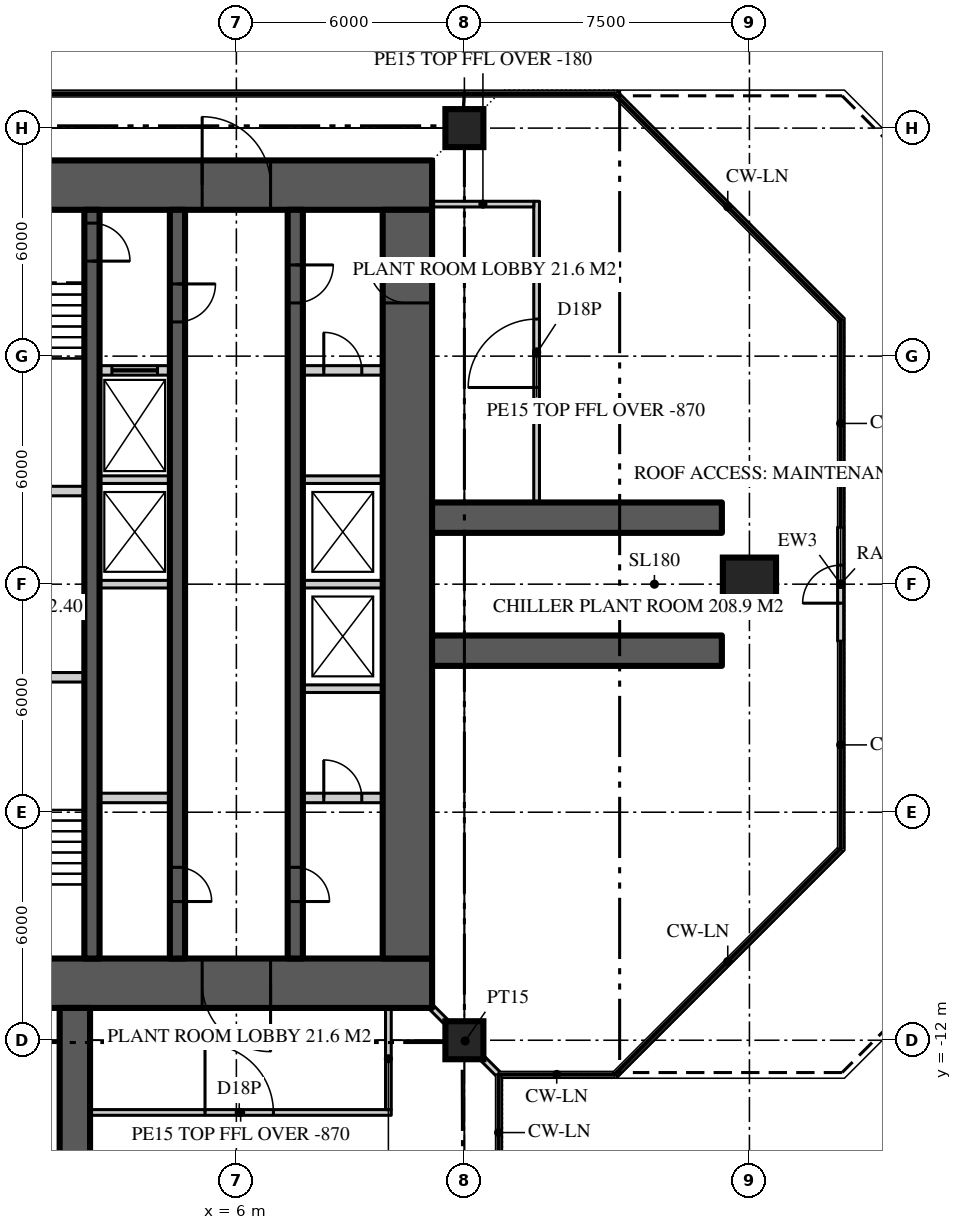
"""IFC4 building model, lengths in metres.
Left out: names, types, materials, properties, quantities, classifications, styles, units other than length and angle.
Written with IfcOpenShell. Run it as: python <this file> out.ifc"""

import sys

from ifc_helpers import new_model, si_unit, direction, frame, frame_2d, origin, origin_2d, place, context, subcontext, project, spatial, rectangle, extrude, element, fill, save


model = new_model("IFC4")
c1 = context("Model", 3, precision=1e-05, world=origin(), true_north=direction((0.0, 1.0)))
c2 = subcontext(c1, "Body", "Model", "MODEL_VIEW")
j1 = project(units=[si_unit("LENGTHUNIT", "METRE"), si_unit("PLANEANGLEUNIT", "RADIAN")], contexts=[c1])
p1 = place(None, origin())
s1 = spatial("IfcSite", under=j1, at=p1, CompositionType="ELEMENT")
p2 = place(p1, origin())
s2 = spatial("IfcBuilding", under=s1, at=p2, CompositionType="ELEMENT")
p3 = place(p2, frame((0.0, 0.0, 306.3)))
s3 = spatial("IfcBuildingStorey", under=s2, at=p3, CompositionType="ELEMENT", Elevation=306.3)
p4 = place(p3, frame((-11.15, 10.5, 0.0), z_axis=(0.0, 0.0, 1.0), x_axis=(1.0, 0.0, 0.0)))
e1 = element("IfcWall", 1, at=p4, inside=s3, PredefinedType="SHEAR", context=c2, shape_type="SweptSolid", body=[
    extrude(rectangle(XDim=22.3, YDim=1.3, at=frame_2d((11.15, 0.0))), origin(), (0.0, 0.0, 1.0), 5.0),
])
p5 = place(p4, frame((4.25, 0.0, 0.0)))
e2 = element("IfcOpeningElement", 2, at=p5, cuts=e1, PredefinedType="OPENING", context=c2, shape_type="SweptSolid", body=[
    extrude(rectangle(XDim=1.8, YDim=2.2, at=frame_2d((0.9, 1.1))), frame((0.0, 0.66, 0.0), z_axis=(0.0, -1.0, 0.0), x_axis=(1.0, 0.0, 0.0)), (0.0, 0.0, 1.0), 1.32),
])
p6 = place(p4, frame((16.25, 0.0, 0.0)))
e3 = element("IfcOpeningElement", 3, at=p6, cuts=e1, PredefinedType="OPENING", context=c2, shape_type="SweptSolid", body=[
    extrude(rectangle(XDim=1.8, YDim=2.2, at=frame_2d((0.9, 1.1))), frame((0.0, 0.66, 0.0), z_axis=(0.0, -1.0, 0.0), x_axis=(1.0, 0.0, 0.0)), (0.0, 0.0, 1.0), 1.32),
])
p7 = place(p3, frame((11.15, -10.5, 0.0), z_axis=(0.0, 0.0, 1.0), x_axis=(-1.0, 0.0, 0.0)))
e4 = element("IfcWall", 4, at=p7, inside=s3, PredefinedType="SHEAR", context=c2, shape_type="SweptSolid", body=[
    extrude(rectangle(XDim=22.3, YDim=1.3, at=frame_2d((11.15, 0.0))), origin(), (0.0, 0.0, 1.0), 5.0),
])
p8 = place(p7, frame((16.25, 0.0, 0.0)))
e5 = element("IfcOpeningElement", 5, at=p8, cuts=e4, PredefinedType="OPENING", context=c2, shape_type="SweptSolid", body=[
    extrude(rectangle(XDim=1.8, YDim=2.2, at=frame_2d((0.9, 1.1))), frame((0.0, 0.66, 0.0), z_axis=(0.0, -1.0, 0.0), x_axis=(1.0, 0.0, 0.0)), (0.0, 0.0, 1.0), 1.32),
])
p9 = place(p7, frame((4.25, 0.0, 0.0)))
e6 = element("IfcOpeningElement", 6, at=p9, cuts=e4, PredefinedType="OPENING", context=c2, shape_type="SweptSolid", body=[
    extrude(rectangle(XDim=1.8, YDim=2.2, at=frame_2d((0.9, 1.1))), frame((0.0, 0.66, 0.0), z_axis=(0.0, -1.0, 0.0), x_axis=(1.0, 0.0, 0.0)), (0.0, 0.0, 1.0), 1.32),
])
p10 = place(p3, frame((10.5, -9.85, 0.0), z_axis=(0.0, 0.0, 1.0), x_axis=(0.0, 1.0, 0.0)))
e7 = element("IfcWall", 7, at=p10, inside=s3, PredefinedType="SHEAR", context=c2, shape_type="SweptSolid", body=[
    extrude(rectangle(XDim=19.7, YDim=1.3, at=frame_2d((9.85, 0.0))), origin(), (0.0, 0.0, 1.0), 5.0),
])
p11 = place(p10, frame((17.25, 0.0, 0.0)))
e8 = element("IfcOpeningElement", 8, at=p11, cuts=e7, PredefinedType="OPENING", context=c2, shape_type="SweptSolid", body=[
    extrude(rectangle(XDim=1.0, YDim=2.2, at=frame_2d((0.5, 1.1))), frame((0.0, 0.66, 0.0), z_axis=(0.0, -1.0, 0.0), x_axis=(1.0, 0.0, 0.0)), (0.0, 0.0, 1.0), 1.32),
])
for number, where, z_axis, x_axis in (
    (9, (11.15, -1.75, 0.0), (0.0, 0.0, 1.0), (1.0, 0.0, 0.0)),
    (10, (11.15, 1.75, 0.0), (0.0, 0.0, 1.0), (1.0, 0.0, 0.0)),
    (11, (1.75, -11.15, 0.0), (0.0, 0.0, 1.0), (0.0, -1.0, 0.0)),
):
    element("IfcWall", number, at=place(p3, frame(where, z_axis=z_axis, x_axis=x_axis)), inside=s3, PredefinedType="SHEAR", context=c2, shape_type="SweptSolid", body=[
        extrude(rectangle(XDim=7.625, YDim=0.8, at=frame_2d((3.812, 0.0))), origin(), (0.0, 0.0, 1.0), 5.0),
    ])
p12 = place(p3, frame((12.0, -12.0, 0.0), z_axis=(0.0, 0.0, 1.0), x_axis=(1.0, 0.0, 0.0)))
e12 = element("IfcColumn", 12, at=p12, inside=s3, PredefinedType="COLUMN", context=c2, shape_type="SweptSolid", body=[
    extrude(rectangle(XDim=1.0, YDim=1.0, at=origin_2d()), origin(), (0.0, 0.0, 1.0), 5.0),
])
p13 = place(p3, frame((19.5, 0.0, 0.0), z_axis=(0.0, 0.0, 1.0), x_axis=(1.0, 0.0, 0.0)))
e13 = element("IfcColumn", 13, at=p13, inside=s3, PredefinedType="COLUMN", context=c2, shape_type="SweptSolid", body=[
    extrude(rectangle(XDim=1.4, YDim=1.4, at=origin_2d()), origin(), (0.0, 0.0, 1.0), 5.0),
])
p14 = place(p3, frame((12.0, 12.0, 0.0), z_axis=(0.0, 0.0, 1.0), x_axis=(1.0, 0.0, 0.0)))
e14 = element("IfcColumn", 14, at=p14, inside=s3, PredefinedType="COLUMN", context=c2, shape_type="SweptSolid", body=[
    extrude(rectangle(XDim=1.0, YDim=1.0, at=origin_2d()), origin(), (0.0, 0.0, 1.0), 5.0),
])
p15 = place(p3, frame((21.9, -1.5, 0.0), z_axis=(0.0, 0.0, 1.0), x_axis=(0.0, 1.0, 0.0)))
e15 = element("IfcWall", 15, at=p15, inside=s3, PredefinedType="SOLIDWALL", context=c2, shape_type="SweptSolid", body=[
    extrude(rectangle(XDim=3.0, YDim=0.16, at=frame_2d((1.5, 0.0))), origin(), (0.0, 0.0, 1.0), 4.82),
])
p16 = place(p15, frame((1.0, 0.0, 0.0)))
e16 = element("IfcOpeningElement", 16, at=p16, cuts=e15, PredefinedType="OPENING", context=c2, shape_type="SweptSolid", body=[
    extrude(rectangle(XDim=1.0, YDim=2.2, at=frame_2d((0.5, 1.1))), frame((0.0, 0.09, 0.0), z_axis=(0.0, -1.0, 0.0), x_axis=(1.0, 0.0, 0.0)), (0.0, 0.0, 1.0), 0.18),
])
p17 = place(p3, frame((7.55, 9.85, 0.0), z_axis=(0.0, 0.0, 1.0), x_axis=(0.0, -1.0, 0.0)))
e17 = element("IfcWall", 17, at=p17, inside=s3, PredefinedType="SHEAR", context=c2, shape_type="SweptSolid", body=[
    extrude(rectangle(XDim=19.7, YDim=0.4, at=frame_2d((9.85, 0.0))), origin(), (0.0, 0.0, 1.0), 5.0),
])
p18 = place(p17, frame((1.45, 0.0, 0.0)))
e18 = element("IfcOpeningElement", 18, at=p18, cuts=e17, PredefinedType="OPENING", context=c2, shape_type="SweptSolid", body=[
    extrude(rectangle(XDim=1.0, YDim=2.2, at=frame_2d((0.5, 1.1))), frame((0.0, 0.21, 0.0), z_axis=(0.0, -1.0, 0.0), x_axis=(1.0, 0.0, 0.0)), (0.0, 0.0, 1.0), 0.42),
])
p19 = place(p17, frame((17.3, 0.0, 0.0)))
e19 = element("IfcOpeningElement", 19, at=p19, cuts=e17, PredefinedType="OPENING", context=c2, shape_type="SweptSolid", body=[
    extrude(rectangle(XDim=0.9, YDim=2.1, at=frame_2d((0.45, 1.05))), frame((0.0, 0.21, 0.0), z_axis=(0.0, -1.0, 0.0), x_axis=(1.0, 0.0, 0.0)), (0.0, 0.0, 1.0), 0.42),
])
p20 = place(p3, frame((4.45, 9.85, 0.0), z_axis=(0.0, 0.0, 1.0), x_axis=(0.0, -1.0, 0.0)))
e20 = element("IfcWall", 20, at=p20, inside=s3, PredefinedType="SHEAR", context=c2, shape_type="SweptSolid", body=[
    extrude(rectangle(XDim=19.7, YDim=0.4, at=frame_2d((9.85, 0.0))), origin(), (0.0, 0.0, 1.0), 5.0),
])
p21 = place(p20, frame((1.95, 0.0, 0.0)))
e21 = element("IfcOpeningElement", 21, at=p21, cuts=e20, PredefinedType="OPENING", context=c2, shape_type="SweptSolid", body=[
    extrude(rectangle(XDim=1.0, YDim=2.2, at=frame_2d((0.5, 1.1))), frame((0.0, 0.21, 0.0), z_axis=(0.0, -1.0, 0.0), x_axis=(1.0, 0.0, 0.0)), (0.0, 0.0, 1.0), 0.42),
])
p22 = place(p20, frame((17.3, 0.0, 0.0)))
e22 = element("IfcOpeningElement", 22, at=p22, cuts=e20, PredefinedType="OPENING", context=c2, shape_type="SweptSolid", body=[
    extrude(rectangle(XDim=0.9, YDim=2.1, at=frame_2d((0.45, 1.05))), frame((0.0, 0.21, 0.0), z_axis=(0.0, -1.0, 0.0), x_axis=(1.0, 0.0, 0.0)), (0.0, 0.0, 1.0), 0.42),
])
p23 = place(p3, frame((2.2, 9.85, 0.0), z_axis=(0.0, 0.0, 1.0), x_axis=(0.0, -1.0, 0.0)))
e23 = element("IfcWall", 23, at=p23, inside=s3, PredefinedType="SHEAR", context=c2, shape_type="SweptSolid", body=[
    extrude(rectangle(XDim=19.7, YDim=0.4, at=frame_2d((9.85, 0.0))), origin(), (0.0, 0.0, 1.0), 5.0),
])
p24 = place(p23, frame((0.35, 0.0, 0.0)))
e24 = element("IfcOpeningElement", 24, at=p24, cuts=e23, PredefinedType="OPENING", context=c2, shape_type="SweptSolid", body=[
    extrude(rectangle(XDim=1.0, YDim=2.2, at=frame_2d((0.5, 1.1))), frame((0.0, 0.21, 0.0), z_axis=(0.0, -1.0, 0.0), x_axis=(1.0, 0.0, 0.0)), (0.0, 0.0, 1.0), 0.42),
])
p25 = place(p3, frame((2.4, 5.625, 0.0), z_axis=(0.0, 0.0, 1.0), x_axis=(1.0, 0.0, 0.0)))
e25 = element("IfcWall", 25, at=p25, inside=s3, PredefinedType="SOLIDWALL", context=c2, shape_type="SweptSolid", body=[
    extrude(rectangle(XDim=1.85, YDim=0.25, at=frame_2d((0.925, 0.0))), origin(), (0.0, 0.0, 1.0), 4.8),
])
p26 = place(p25, frame((0.325, 0.0, 0.0)))
e26 = element("IfcOpeningElement", 26, at=p26, cuts=e25, PredefinedType="OPENING", context=c2, shape_type="SweptSolid", body=[
    extrude(rectangle(XDim=1.2, YDim=2.2, at=frame_2d((0.6, 1.1))), frame((0.0, 0.135, 0.0), z_axis=(0.0, -1.0, 0.0), x_axis=(1.0, 0.0, 0.0)), (0.0, 0.0, 1.0), 0.27),
])
p27 = place(p3, frame((7.75, 5.625, 0.0), z_axis=(0.0, 0.0, 1.0), x_axis=(1.0, 0.0, 0.0)))
e27 = element("IfcWall", 27, at=p27, inside=s3, PredefinedType="SOLIDWALL", context=c2, shape_type="SweptSolid", body=[
    extrude(rectangle(XDim=2.1, YDim=0.25, at=frame_2d((1.05, 0.0))), origin(), (0.0, 0.0, 1.0), 4.8),
])
p28 = place(p27, frame((0.55, 0.0, 0.0)))
e28 = element("IfcOpeningElement", 28, at=p28, cuts=e27, PredefinedType="OPENING", context=c2, shape_type="SweptSolid", body=[
    extrude(rectangle(XDim=1.0, YDim=2.2, at=frame_2d((0.5, 1.1))), frame((0.0, 0.135, 0.0), z_axis=(0.0, -1.0, 0.0), x_axis=(1.0, 0.0, 0.0)), (0.0, 0.0, 1.0), 0.27),
])
p29 = place(p3, frame((2.4, -5.625, 0.0), z_axis=(0.0, 0.0, 1.0), x_axis=(1.0, 0.0, 0.0)))
e29 = element("IfcWall", 29, at=p29, inside=s3, PredefinedType="SOLIDWALL", context=c2, shape_type="SweptSolid", body=[
    extrude(rectangle(XDim=1.85, YDim=0.25, at=frame_2d((0.925, 0.0))), origin(), (0.0, 0.0, 1.0), 4.8),
])
p30 = place(p3, frame((7.75, -5.625, 0.0), z_axis=(0.0, 0.0, 1.0), x_axis=(1.0, 0.0, 0.0)))
e30 = element("IfcWall", 30, at=p30, inside=s3, PredefinedType="SOLIDWALL", context=c2, shape_type="SweptSolid", body=[
    extrude(rectangle(XDim=2.1, YDim=0.25, at=frame_2d((1.05, 0.0))), origin(), (0.0, 0.0, 1.0), 4.8),
])
p31 = place(p30, frame((0.55, 0.0, 0.0)))
e31 = element("IfcOpeningElement", 31, at=p31, cuts=e30, PredefinedType="OPENING", context=c2, shape_type="SweptSolid", body=[
    extrude(rectangle(XDim=1.0, YDim=2.2, at=frame_2d((0.5, 1.1))), frame((0.0, 0.135, 0.0), z_axis=(0.0, -1.0, 0.0), x_axis=(1.0, 0.0, 0.0)), (0.0, 0.0, 1.0), 0.27),
])
for number, where, z_axis, x_axis in (
    (32, (-2.0, -2.45, 0.0), (0.0, 0.0, 1.0), (1.0, 0.0, 0.0)),
    (33, (-2.0, 2.45, 0.0), (0.0, 0.0, 1.0), (1.0, 0.0, 0.0)),
):
    element("IfcWall", number, at=place(p3, frame(where, z_axis=z_axis, x_axis=x_axis)), inside=s3, PredefinedType="SOLIDWALL", context=c2, shape_type="SweptSolid", body=[
        extrude(rectangle(XDim=4.0, YDim=0.25, at=frame_2d((2.0, 0.0))), origin(), (0.0, 0.0, 1.0), 4.8),
    ])
p32 = place(p3, frame((7.75, -2.75, 0.0), z_axis=(0.0, 0.0, 1.0), x_axis=(1.0, 0.0, 0.0)))
e34 = element("IfcWall", 34, at=p32, inside=s3, PredefinedType="SOLIDWALL", context=c2, shape_type="SweptSolid", body=[
    extrude(rectangle(XDim=2.1, YDim=0.2, at=frame_2d((1.05, 0.0))), origin(), (0.0, 0.0, 1.0), 4.8),
])
p33 = place(p3, frame((2.4, 0.0, 0.0), z_axis=(0.0, 0.0, 1.0), x_axis=(1.0, 0.0, 0.0)))
e35 = element("IfcWall", 35, at=p33, inside=s3, PredefinedType="SOLIDWALL", context=c2, shape_type="SweptSolid", body=[
    extrude(rectangle(XDim=1.85, YDim=0.2, at=frame_2d((0.925, 0.0))), origin(), (0.0, 0.0, 1.0), 4.8),
])
p34 = place(p3, frame((7.75, 0.0, 0.0), z_axis=(0.0, 0.0, 1.0), x_axis=(1.0, 0.0, 0.0)))
e36 = element("IfcWall", 36, at=p34, inside=s3, PredefinedType="SOLIDWALL", context=c2, shape_type="SweptSolid", body=[
    extrude(rectangle(XDim=2.1, YDim=0.2, at=frame_2d((1.05, 0.0))), origin(), (0.0, 0.0, 1.0), 4.8),
])
p35 = place(p3, frame((2.4, 2.75, 0.0), z_axis=(0.0, 0.0, 1.0), x_axis=(1.0, 0.0, 0.0)))
e37 = element("IfcWall", 37, at=p35, inside=s3, PredefinedType="SOLIDWALL", context=c2, shape_type="SweptSolid", body=[
    extrude(rectangle(XDim=1.85, YDim=0.2, at=frame_2d((0.925, 0.0))), origin(), (0.0, 0.0, 1.0), 4.8),
])
p36 = place(p3, frame((7.75, 2.75, 0.0), z_axis=(0.0, 0.0, 1.0), x_axis=(1.0, 0.0, 0.0)))
e38 = element("IfcWall", 38, at=p36, inside=s3, PredefinedType="SOLIDWALL", context=c2, shape_type="SweptSolid", body=[
    extrude(rectangle(XDim=2.1, YDim=0.2, at=frame_2d((1.05, 0.0))), origin(), (0.0, 0.0, 1.0), 4.8),
])
p37 = place(p3, frame((13.9, 2.15, 0.0), z_axis=(0.0, 0.0, 1.0), x_axis=(0.0, 1.0, 0.0)))
e39 = element("IfcWall", 39, at=p37, inside=s3, PredefinedType="SOLIDWALL", context=c2, shape_type="SweptSolid", body=[
    extrude(rectangle(XDim=7.925, YDim=0.15, at=frame_2d((3.962, 0.0))), origin(), (0.0, 0.0, 1.0), 4.13),
])
p38 = place(p37, frame((3.025, 0.0, 0.0)))
e40 = element("IfcOpeningElement", 40, at=p38, cuts=e39, PredefinedType="OPENING", context=c2, shape_type="SweptSolid", body=[
    extrude(rectangle(XDim=1.8, YDim=2.4, at=frame_2d((0.9, 1.2))), frame((0.0, 0.085, 0.0), z_axis=(0.0, -1.0, 0.0), x_axis=(1.0, 0.0, 0.0)), (0.0, 0.0, 1.0), 0.17),
])
p39 = place(p3, frame((11.15, 10.0, 0.0), z_axis=(0.0, 0.0, 1.0), x_axis=(1.0, 0.0, 0.0)))
e41 = element("IfcWall", 41, at=p39, inside=s3, PredefinedType="SOLIDWALL", context=c2, shape_type="SweptSolid", body=[
    extrude(rectangle(XDim=2.675, YDim=0.15, at=frame_2d((1.337, 0.0))), origin(), (0.0, 0.0, 1.0), 4.82),
])
p40 = place(p3, frame((2.15, -13.9, 0.0), z_axis=(0.0, 0.0, 1.0), x_axis=(1.0, 0.0, 0.0)))
e42 = element("IfcWall", 42, at=p40, inside=s3, PredefinedType="SOLIDWALL", context=c2, shape_type="SweptSolid", body=[
    extrude(rectangle(XDim=7.925, YDim=0.15, at=frame_2d((3.962, 0.0))), origin(), (0.0, 0.0, 1.0), 4.13),
])
p41 = place(p40, frame((3.025, 0.0, 0.0)))
e43 = element("IfcOpeningElement", 43, at=p41, cuts=e42, PredefinedType="OPENING", context=c2, shape_type="SweptSolid", body=[
    extrude(rectangle(XDim=1.8, YDim=2.4, at=frame_2d((0.9, 1.2))), frame((0.0, 0.085, 0.0), z_axis=(0.0, -1.0, 0.0), x_axis=(1.0, 0.0, 0.0)), (0.0, 0.0, 1.0), 0.17),
])
p42 = place(p3, frame((10.0, -11.15, 0.0), z_axis=(0.0, 0.0, 1.0), x_axis=(0.0, -1.0, 0.0)))
e44 = element("IfcWall", 44, at=p42, inside=s3, PredefinedType="SOLIDWALL", context=c2, shape_type="SweptSolid", body=[
    extrude(rectangle(XDim=2.675, YDim=0.15, at=frame_2d((1.337, 0.0))), origin(), (0.0, 0.0, 1.0), 4.82),
])
p43 = place(p3, frame((11.15, -11.15, 0.0), z_axis=(0.0, 0.0, 1.0), x_axis=(0.707106781187, -0.707106781187, 0.0)))
e45 = element("IfcWall", 45, at=p43, inside=s3, PredefinedType="PARTITIONING", context=c2, shape_type="SweptSolid", body=[
    extrude(rectangle(XDim=2.461, YDim=0.15, at=frame_2d((1.23, 0.0))), origin(), (0.0, 0.0, 1.0), 4.82),
])
p44 = place(p16, origin())
e46 = element("IfcDoor", 46, at=p44, inside=s3, OperationType="SINGLE_SWING_LEFT", PredefinedType="DOOR", context=c2, shape_type="SweptSolid", body=[
    extrude(rectangle(XDim=1.0, YDim=2.2, at=frame_2d((0.5, 1.1))), frame((0.0, 0.025, 0.0), z_axis=(0.0, -1.0, 0.0), x_axis=(1.0, 0.0, 0.0)), (0.0, 0.0, 1.0), 0.05),
])
fill(e16, e46)
p45 = place(p6, origin())
e47 = element("IfcDoor", 47, at=p45, inside=s3, OperationType="DOUBLE_DOOR_DOUBLE_SWING", PredefinedType="DOOR", context=c2, shape_type="SweptSolid", body=[
    extrude(rectangle(XDim=1.8, YDim=2.2, at=frame_2d((0.9, 1.1))), frame((0.0, 0.025, 0.0), z_axis=(0.0, -1.0, 0.0), x_axis=(1.0, 0.0, 0.0)), (0.0, 0.0, 1.0), 0.05),
])
fill(e3, e47)
p46 = place(p9, origin())
e48 = element("IfcDoor", 48, at=p46, inside=s3, OperationType="DOUBLE_DOOR_DOUBLE_SWING", PredefinedType="DOOR", context=c2, shape_type="SweptSolid", body=[
    extrude(rectangle(XDim=1.8, YDim=2.2, at=frame_2d((0.9, 1.1))), frame((0.0, 0.025, 0.0), z_axis=(0.0, -1.0, 0.0), x_axis=(1.0, 0.0, 0.0)), (0.0, 0.0, 1.0), 0.05),
])
fill(e6, e48)
p47 = place(p18, origin())
e49 = element("IfcDoor", 49, at=p47, inside=s3, OperationType="SINGLE_SWING_LEFT", PredefinedType="DOOR", context=c2, shape_type="SweptSolid", body=[
    extrude(rectangle(XDim=1.0, YDim=2.2, at=frame_2d((0.5, 1.1))), frame((0.0, 0.025, 0.0), z_axis=(0.0, -1.0, 0.0), x_axis=(1.0, 0.0, 0.0)), (0.0, 0.0, 1.0), 0.05),
])
fill(e18, e49)
p48 = place(p11, origin())
e50 = element("IfcDoor", 50, at=p48, inside=s3, OperationType="SINGLE_SWING_RIGHT", PredefinedType="DOOR", context=c2, shape_type="SweptSolid", body=[
    extrude(rectangle(XDim=1.0, YDim=2.2, at=frame_2d((0.5, 1.1))), frame((0.0, 0.025, 0.0), z_axis=(0.0, -1.0, 0.0), x_axis=(1.0, 0.0, 0.0)), (0.0, 0.0, 1.0), 0.05),
])
fill(e8, e50)
p49 = place(p21, origin())
e51 = element("IfcDoor", 51, at=p49, inside=s3, OperationType="SINGLE_SWING_LEFT", PredefinedType="DOOR", context=c2, shape_type="SweptSolid", body=[
    extrude(rectangle(XDim=1.0, YDim=2.2, at=frame_2d((0.5, 1.1))), frame((0.0, 0.025, 0.0), z_axis=(0.0, -1.0, 0.0), x_axis=(1.0, 0.0, 0.0)), (0.0, 0.0, 1.0), 0.05),
])
fill(e21, e51)
p50 = place(p24, origin())
e52 = element("IfcDoor", 52, at=p50, inside=s3, OperationType="SINGLE_SWING_RIGHT", PredefinedType="DOOR", context=c2, shape_type="SweptSolid", body=[
    extrude(rectangle(XDim=1.0, YDim=2.2, at=frame_2d((0.5, 1.1))), frame((0.0, 0.025, 0.0), z_axis=(0.0, -1.0, 0.0), x_axis=(1.0, 0.0, 0.0)), (0.0, 0.0, 1.0), 0.05),
])
fill(e24, e52)
p51 = place(p19, origin())
e53 = element("IfcDoor", 53, at=p51, inside=s3, OperationType="SINGLE_SWING_RIGHT", PredefinedType="DOOR", context=c2, shape_type="SweptSolid", body=[
    extrude(rectangle(XDim=0.9, YDim=2.1, at=frame_2d((0.45, 1.05))), frame((0.0, 0.025, 0.0), z_axis=(0.0, -1.0, 0.0), x_axis=(1.0, 0.0, 0.0)), (0.0, 0.0, 1.0), 0.05),
])
fill(e19, e53)
p52 = place(p22, origin())
e54 = element("IfcDoor", 54, at=p52, inside=s3, OperationType="SINGLE_SWING_RIGHT", PredefinedType="DOOR", context=c2, shape_type="SweptSolid", body=[
    extrude(rectangle(XDim=0.9, YDim=2.1, at=frame_2d((0.45, 1.05))), frame((0.0, 0.025, 0.0), z_axis=(0.0, -1.0, 0.0), x_axis=(1.0, 0.0, 0.0)), (0.0, 0.0, 1.0), 0.05),
])
fill(e22, e54)
p53 = place(p26, origin())
e55 = element("IfcDoor", 55, at=p53, inside=s3, OperationType="SLIDING_TO_LEFT", PredefinedType="DOOR", context=c2, shape_type="SweptSolid", body=[
    extrude(rectangle(XDim=1.2, YDim=2.2, at=frame_2d((0.6, 1.1))), frame((0.0, 0.025, 0.0), z_axis=(0.0, -1.0, 0.0), x_axis=(1.0, 0.0, 0.0)), (0.0, 0.0, 1.0), 0.05),
])
fill(e26, e55)
p54 = place(p38, origin())
e56 = element("IfcDoor", 56, at=p54, inside=s3, OperationType="DOUBLE_DOOR_DOUBLE_SWING", PredefinedType="DOOR", context=c2, shape_type="SweptSolid", body=[
    extrude(rectangle(XDim=1.8, YDim=2.4, at=frame_2d((0.9, 1.2))), frame((0.0, 0.025, 0.0), z_axis=(0.0, -1.0, 0.0), x_axis=(1.0, 0.0, 0.0)), (0.0, 0.0, 1.0), 0.05),
])
fill(e40, e56)
p55 = place(p41, origin())
e57 = element("IfcDoor", 57, at=p55, inside=s3, OperationType="DOUBLE_DOOR_DOUBLE_SWING", PredefinedType="DOOR", context=c2, shape_type="SweptSolid", body=[
    extrude(rectangle(XDim=1.8, YDim=2.4, at=frame_2d((0.9, 1.2))), frame((0.0, 0.025, 0.0), z_axis=(0.0, -1.0, 0.0), x_axis=(1.0, 0.0, 0.0)), (0.0, 0.0, 1.0), 0.05),
])
fill(e43, e57)
p56 = place(p28, origin())
e58 = element("IfcDoor", 58, at=p56, inside=s3, OperationType="SINGLE_SWING_LEFT", PredefinedType="DOOR", context=c2, shape_type="SweptSolid", body=[
    extrude(rectangle(XDim=1.0, YDim=2.2, at=frame_2d((0.5, 1.1))), frame((0.0, 0.025, 0.0), z_axis=(0.0, -1.0, 0.0), x_axis=(1.0, 0.0, 0.0)), (0.0, 0.0, 1.0), 0.05),
])
fill(e28, e58)
p57 = place(p31, origin())
e59 = element("IfcDoor", 59, at=p57, inside=s3, OperationType="SINGLE_SWING_LEFT", PredefinedType="DOOR", context=c2, shape_type="SweptSolid", body=[
    extrude(rectangle(XDim=1.0, YDim=2.2, at=frame_2d((0.5, 1.1))), frame((0.0, 0.025, 0.0), z_axis=(0.0, -1.0, 0.0), x_axis=(1.0, 0.0, 0.0)), (0.0, 0.0, 1.0), 0.05),
])
fill(e31, e59)
save(model, sys.argv[1])
